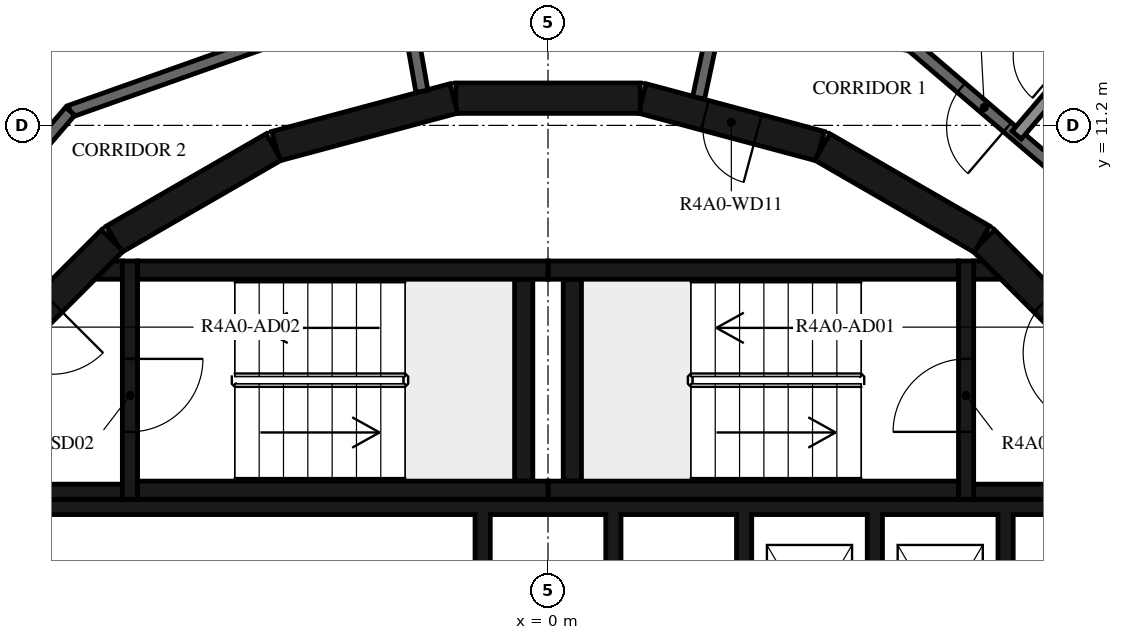
"""IFC4 building model, lengths in metres.
Left out: names, types, materials, properties, quantities, classifications, styles, units other than length and angle.
Written with IfcOpenShell. Run it as: python <this file> out.ifc"""

import sys

from ifc_helpers import new_model, si_unit, direction, frame, frame_2d, origin, place, context, subcontext, project, spatial, polyline, rectangle, outline, extrude, element, fill, save


model = new_model("IFC4")
c1 = context("Model", 3, precision=1e-05, world=origin(), true_north=direction((0.0, 1.0)))
c2 = subcontext(c1, "Body", "Model", "MODEL_VIEW")
j1 = project(units=[si_unit("LENGTHUNIT", "METRE"), si_unit("PLANEANGLEUNIT", "RADIAN")], contexts=[c1])
p1 = place(None, origin())
s1 = spatial("IfcSite", under=j1, at=p1, CompositionType="ELEMENT")
p2 = place(p1, origin())
s2 = spatial("IfcBuilding", under=s1, at=p2, CompositionType="ELEMENT")
p3 = place(p2, frame((0.0, 0.0, 158.7)))
s3 = spatial("IfcBuildingStorey", under=s2, at=p3, CompositionType="ELEMENT", Elevation=158.7)
p4 = place(p3, frame((9.308, 7.164, 0.0), z_axis=(0.0, 0.0, 1.0), x_axis=(-0.707106781187, 0.707106781187, 0.0)))
e1 = element("IfcWall", 1, at=p4, inside=s3, PredefinedType="SHEAR", context=c2, shape_type="SweptSolid", body=[
    extrude(rectangle(XDim=3.032, YDim=0.5, at=frame_2d((1.516, 0.0))), origin(), (0.0, 0.0, 1.0), 3.12),
])
p5 = place(p4, frame((0.416, 0.0, 0.0)))
e2 = element("IfcOpeningElement", 2, at=p5, cuts=e1, PredefinedType="OPENING", context=c2, shape_type="SweptSolid", body=[
    extrude(rectangle(XDim=1.2, YDim=2.1, at=frame_2d((0.6, 1.05))), frame((0.0, 0.26, 0.0), z_axis=(0.0, -1.0, 0.0), x_axis=(1.0, 0.0, 0.0)), (0.0, 0.0, 1.0), 0.52),
])
p6 = place(p3, frame((7.137, 9.329, 0.0), z_axis=(0.0, 0.0, 1.0), x_axis=(-0.865975092491, 0.500087131594, 0.0)))
e3 = element("IfcWall", 3, at=p6, inside=s3, PredefinedType="SHEAR", context=c2, shape_type="SweptSolid", body=[
    extrude(rectangle(XDim=3.033, YDim=0.5, at=frame_2d((1.516, 0.0))), origin(), (0.0, 0.0, 1.0), 3.12),
])
p7 = place(p3, frame((4.479, 10.858, 0.0), z_axis=(0.0, 0.0, 1.0), x_axis=(-0.965948410781, 0.258734743916, 0.0)))
e4 = element("IfcWall", 4, at=p7, inside=s3, PredefinedType="SHEAR", context=c2, shape_type="SweptSolid", body=[
    extrude(rectangle(XDim=3.033, YDim=0.5, at=frame_2d((1.516, 0.0))), origin(), (0.0, 0.0, 1.0), 3.12),
])
p8 = place(p7, frame((1.066, 0.0, 0.0)))
e5 = element("IfcOpeningElement", 5, at=p8, cuts=e4, PredefinedType="OPENING", context=c2, shape_type="SweptSolid", body=[
    extrude(rectangle(XDim=0.9, YDim=2.1, at=frame_2d((0.45, 1.05))), frame((0.0, 0.26, 0.0), z_axis=(0.0, -1.0, 0.0), x_axis=(1.0, 0.0, 0.0)), (0.0, 0.0, 1.0), 0.52),
])
for number, where, z_axis, x_axis in (
    (6, (1.516, 11.647, 0.0), (0.0, 0.0, 1.0), (-1.0, 0.0, 0.0)),
    (7, (-1.55, 11.643, 0.0), (0.0, 0.0, 1.0), (-0.966, -0.259, 0.0)),
    (8, (-4.51, 10.845, 0.0), (0.0, 0.0, 1.0), (-0.866, -0.5, 0.0)),
):
    element("IfcWall", number, at=place(p3, frame(where, z_axis=z_axis, x_axis=x_axis)), inside=s3, PredefinedType="SHEAR", context=c2, shape_type="SweptSolid", body=[
        extrude(rectangle(XDim=3.033, YDim=0.5, at=frame_2d((1.516, 0.0))), origin(), (0.0, 0.0, 1.0), 3.12),
    ])
p9 = place(p3, frame((-7.164, 9.308, 0.0), z_axis=(0.0, 0.0, 1.0), x_axis=(-0.707106781187, -0.707106781187, 0.0)))
e9 = element("IfcWall", 9, at=p9, inside=s3, PredefinedType="SHEAR", context=c2, shape_type="SweptSolid", body=[
    extrude(rectangle(XDim=3.032, YDim=0.5, at=frame_2d((1.516, 0.0))), origin(), (0.0, 0.0, 1.0), 3.12),
])
p10 = place(p9, frame((1.416, 0.0, 0.0)))
e10 = element("IfcOpeningElement", 10, at=p10, cuts=e9, PredefinedType="OPENING", context=c2, shape_type="SweptSolid", body=[
    extrude(rectangle(XDim=1.2, YDim=2.1, at=frame_2d((0.6, 1.05))), frame((0.0, 0.26, 0.0), z_axis=(0.0, -1.0, 0.0), x_axis=(1.0, 0.0, 0.0)), (0.0, 0.0, 1.0), 0.52),
])
for number, where, z_axis, x_axis in (
    (11, (0.0, 5.2, 0.0), (0.0, 0.0, 1.0), (1.0, 0.0, 0.0)),
    (12, (0.0, 8.82, 0.0), (0.0, 0.0, 1.0), (1.0, 0.0, 0.0)),
):
    element("IfcWall", number, at=place(p3, frame(where, z_axis=z_axis, x_axis=x_axis)), inside=s3, PredefinedType="SHEAR", context=c2, shape_type="SweptSolid", body=[
        extrude(rectangle(XDim=6.75, YDim=0.3, at=frame_2d((3.375, 0.0))), origin(), (0.0, 0.0, 1.0), 3.12),
    ])
p11 = place(p3, frame((0.4, 5.35, 0.0), z_axis=(0.0, 0.0, 1.0), x_axis=(0.0, 1.0, 0.0)))
e13 = element("IfcWall", 13, at=p11, inside=s3, PredefinedType="SHEAR", context=c2, shape_type="SweptSolid", body=[
    extrude(rectangle(XDim=3.32, YDim=0.3, at=frame_2d((1.66, 0.0))), origin(), (0.0, 0.0, 1.0), 3.12),
])
p12 = place(p3, frame((6.875, 5.05, 0.0), z_axis=(0.0, 0.0, 1.0), x_axis=(0.0, 1.0, 0.0)))
e14 = element("IfcWall", 14, at=p12, inside=s3, PredefinedType="SHEAR", context=c2, shape_type="SweptSolid", body=[
    extrude(rectangle(XDim=3.92, YDim=0.25, at=frame_2d((1.96, 0.0))), origin(), (0.0, 0.0, 1.0), 3.12),
])
p13 = place(p12, frame((1.11, 0.0, 0.0)))
e15 = element("IfcOpeningElement", 15, at=p13, cuts=e14, PredefinedType="OPENING", context=c2, shape_type="SweptSolid", body=[
    extrude(rectangle(XDim=1.2, YDim=2.1, at=frame_2d((0.6, 1.05))), frame((0.0, 0.135, 0.0), z_axis=(0.0, -1.0, 0.0), x_axis=(1.0, 0.0, 0.0)), (0.0, 0.0, 1.0), 0.27),
])
p14 = place(p3, frame((7.0, 5.175, 0.0), z_axis=(0.0, 0.0, 1.0), x_axis=(1.0, 0.0, 0.0)))
e16 = element("IfcWall", 16, at=p14, inside=s3, PredefinedType="SHEAR", context=c2, shape_type="SweptSolid", body=[
    extrude(rectangle(XDim=3.1, YDim=0.25, at=frame_2d((1.55, 0.0))), origin(), (0.0, 0.0, 1.0), 3.12),
])
p15 = place(p3, origin())
e17 = element("IfcWall", 17, at=p15, inside=s3, PredefinedType="SHEAR", context=c2, shape_type="SweptSolid", body=[
    extrude(outline(polyline([(7.448, 8.67), (7.0, 8.67), (7.0, 8.97), (7.148, 8.97), (7.448, 8.67)])), origin(), (0.0, 0.0, 1.0), 3.12),
])
for number, where, z_axis, x_axis in (
    (18, (-6.75, 5.2, 0.0), (0.0, 0.0, 1.0), (1.0, 0.0, 0.0)),
    (19, (-6.75, 8.82, 0.0), (0.0, 0.0, 1.0), (1.0, 0.0, 0.0)),
):
    element("IfcWall", number, at=place(p3, frame(where, z_axis=z_axis, x_axis=x_axis)), inside=s3, PredefinedType="SHEAR", context=c2, shape_type="SweptSolid", body=[
        extrude(rectangle(XDim=6.75, YDim=0.3, at=frame_2d((3.375, 0.0))), origin(), (0.0, 0.0, 1.0), 3.12),
    ])
p16 = place(p3, frame((-0.4, 5.35, 0.0), z_axis=(0.0, 0.0, 1.0), x_axis=(0.0, 1.0, 0.0)))
e20 = element("IfcWall", 20, at=p16, inside=s3, PredefinedType="SHEAR", context=c2, shape_type="SweptSolid", body=[
    extrude(rectangle(XDim=3.32, YDim=0.3, at=frame_2d((1.66, 0.0))), origin(), (0.0, 0.0, 1.0), 3.12),
])
p17 = place(p3, frame((-6.875, 8.97, 0.0), z_axis=(0.0, 0.0, 1.0), x_axis=(0.0, -1.0, 0.0)))
e21 = element("IfcWall", 21, at=p17, inside=s3, PredefinedType="SHEAR", context=c2, shape_type="SweptSolid", body=[
    extrude(rectangle(XDim=3.92, YDim=0.25, at=frame_2d((1.96, 0.0))), origin(), (0.0, 0.0, 1.0), 3.12),
])
p18 = place(p17, frame((1.61, 0.0, 0.0)))
e22 = element("IfcOpeningElement", 22, at=p18, cuts=e21, PredefinedType="OPENING", context=c2, shape_type="SweptSolid", body=[
    extrude(rectangle(XDim=1.2, YDim=2.1, at=frame_2d((0.6, 1.05))), frame((0.0, 0.135, 0.0), z_axis=(0.0, -1.0, 0.0), x_axis=(1.0, 0.0, 0.0)), (0.0, 0.0, 1.0), 0.27),
])
p19 = place(p3, frame((-7.0, 5.175, 0.0), z_axis=(0.0, 0.0, 1.0), x_axis=(-1.0, 0.0, 0.0)))
e23 = element("IfcWall", 23, at=p19, inside=s3, PredefinedType="SHEAR", context=c2, shape_type="SweptSolid", body=[
    extrude(rectangle(XDim=3.1, YDim=0.25, at=frame_2d((1.55, 0.0))), origin(), (0.0, 0.0, 1.0), 3.12),
])
p20 = place(p3, origin())
e24 = element("IfcWall", 24, at=p20, inside=s3, PredefinedType="SHEAR", context=c2, shape_type="SweptSolid", body=[
    extrude(outline(polyline([(-7.148, 8.97), (-7.0, 8.97), (-7.0, 8.67), (-7.448, 8.67), (-7.148, 8.97)])), origin(), (0.0, 0.0, 1.0), 3.12),
])
p21 = place(p3, origin())
e25 = element("IfcWall", 25, at=p21, inside=s3, PredefinedType="SHEAR", context=c2, shape_type="SweptSolid", body=[
    extrude(outline(polyline([(-9.55, 4.8), (-1.2, 4.8), (-1.2, 1.9), (-0.95, 1.9), (-0.95, 4.8), (0.95, 4.8), (0.95, 1.9), (1.2, 1.9), (1.2, 4.8), (3.1, 4.8), (3.1, 1.9), (3.35, 1.9), (3.35, 4.8), (5.25, 4.8), (5.25, 1.9), (5.5, 1.9), (5.5, 4.8), (7.4, 4.8), (7.4, 1.9), (7.65, 1.9), (7.65, 4.8), (9.55, 4.8), (9.55, 1.9), (9.8, 1.9), (9.8, 4.8), (9.8, 5.05), (-9.8, 5.05), (-9.8, 4.8), (-9.8, 1.9), (-9.55, 1.9), (-9.55, 4.8)])), origin(), (0.0, 0.0, 1.0), 3.12),
])
p22 = place(p3, frame((11.433, 7.858, 0.0), z_axis=(0.0, 0.0, 1.0), x_axis=(-0.760412154545, 0.649440801937, 0.0)))
e26 = element("IfcWall", 26, at=p22, inside=s3, PredefinedType="STANDARD", context=c2, shape_type="SweptSolid", body=[
    extrude(rectangle(XDim=7.181, YDim=0.2, at=frame_2d((3.59, 0.0))), origin(), (0.0, 0.0, 1.0), 3.12),
])
p23 = place(p22, frame((1.7, 0.0, 0.0)))
e27 = element("IfcOpeningElement", 27, at=p23, cuts=e26, PredefinedType="OPENING", context=c2, shape_type="SweptSolid", body=[
    extrude(rectangle(XDim=1.0, YDim=2.1, at=frame_2d((0.5, 1.05))), frame((0.0, 0.11, 0.0), z_axis=(0.0, -1.0, 0.0), x_axis=(1.0, 0.0, 0.0)), (0.0, 0.0, 1.0), 0.22),
])
p24 = place(p22, frame((5.101, 0.0, 0.0)))
e28 = element("IfcOpeningElement", 28, at=p24, cuts=e26, PredefinedType="OPENING", context=c2, shape_type="SweptSolid", body=[
    extrude(rectangle(XDim=1.0, YDim=2.1, at=frame_2d((0.5, 1.05))), frame((0.0, 0.11, 0.0), z_axis=(0.0, -1.0, 0.0), x_axis=(1.0, 0.0, 0.0)), (0.0, 0.0, 1.0), 0.22),
])
p25 = place(p3, frame((2.787, 13.112, 0.0), z_axis=(0.0, 0.0, 1.0), x_axis=(-0.207941001029, -0.978141370197, 0.0)))
e29 = element("IfcWall", 29, at=p25, inside=s3, PredefinedType="STANDARD", context=c2, shape_type="SweptSolid", body=[
    extrude(rectangle(XDim=1.491, YDim=0.2, at=frame_2d((0.746, 0.0))), origin(), (0.0, 0.0, 1.0), 3.12),
])
p26 = place(p3, frame((-2.074, 11.761, 0.0), z_axis=(0.0, 0.0, 1.0), x_axis=(-0.1736412798, 0.984808969267, 0.0)))
e30 = element("IfcWall", 30, at=p26, inside=s3, PredefinedType="STANDARD", context=c2, shape_type="SweptSolid", body=[
    extrude(rectangle(XDim=1.644, YDim=0.2, at=frame_2d((0.822, 0.0))), origin(), (0.0, 0.0, 1.0), 3.12),
])
p27 = place(p3, frame((-2.359, 13.38, 0.0), z_axis=(0.0, 0.0, 1.0), x_axis=(-0.942647529236, -0.333789807551, 0.0)))
e31 = element("IfcWall", 31, at=p27, inside=s3, PredefinedType="STANDARD", context=c2, shape_type="SweptSolid", body=[
    extrude(rectangle(XDim=5.833, YDim=0.2, at=frame_2d((2.917, 0.0))), origin(), (0.0, 0.0, 1.0), 3.12),
])
p28 = place(p3, frame((-7.858, 11.433, 0.0), z_axis=(0.0, 0.0, 1.0), x_axis=(-0.649440801937, -0.760412154545, 0.0)))
e32 = element("IfcWall", 32, at=p28, inside=s3, PredefinedType="STANDARD", context=c2, shape_type="SweptSolid", body=[
    extrude(rectangle(XDim=7.181, YDim=0.2, at=frame_2d((3.59, 0.0))), origin(), (0.0, 0.0, 1.0), 3.12),
])
p29 = place(p28, frame((2.6, 0.0, 0.0)))
e33 = element("IfcOpeningElement", 33, at=p29, cuts=e32, PredefinedType="OPENING", context=c2, shape_type="SweptSolid", body=[
    extrude(rectangle(XDim=1.0, YDim=2.1, at=frame_2d((0.5, 1.05))), frame((0.0, 0.11, 0.0), z_axis=(0.0, -1.0, 0.0), x_axis=(1.0, 0.0, 0.0)), (0.0, 0.0, 1.0), 0.22),
])
p30 = place(p3, frame((11.04, 14.943, 0.0), z_axis=(0.0, 0.0, 1.0), x_axis=(-0.649442880087, -0.760410379666, 0.0)))
e34 = element("IfcWall", 34, at=p30, inside=s3, PredefinedType="STANDARD", context=c2, shape_type="SweptSolid", body=[
    extrude(rectangle(XDim=5.133, YDim=0.2, at=frame_2d((2.566, 0.0))), origin(), (0.0, 0.0, 1.0), 2.73),
])
p31 = place(p3, frame((8.702, 12.206, 0.0), z_axis=(0.0, 0.0, 1.0), x_axis=(-0.760401313718, 0.649453494945, 0.0)))
e35 = element("IfcWall", 35, at=p31, inside=s3, PredefinedType="PARTITIONING", context=c2, shape_type="SweptSolid", body=[
    extrude(rectangle(XDim=16.724, YDim=0.12, at=frame_2d((8.362, 0.0))), origin(), (0.0, 0.0, 1.0), 3.12),
])
p32 = place(p31, frame((0.2, 0.0, 0.0)))
e36 = element("IfcOpeningElement", 36, at=p32, cuts=e35, PredefinedType="OPENING", context=c2, shape_type="SweptSolid", body=[
    extrude(rectangle(XDim=0.9, YDim=2.1, at=frame_2d((0.45, 1.05))), frame((0.0, 0.07, 0.0), z_axis=(0.0, -1.0, 0.0), x_axis=(1.0, 0.0, 0.0)), (0.0, 0.0, 1.0), 0.14),
])
p33 = place(p31, frame((7.099, 0.0, 0.0)))
e37 = element("IfcOpeningElement", 37, at=p33, cuts=e35, PredefinedType="OPENING", context=c2, shape_type="SweptSolid", body=[
    extrude(rectangle(XDim=0.9, YDim=2.1, at=frame_2d((0.45, 1.05))), frame((0.0, 0.07, 0.0), z_axis=(0.0, -1.0, 0.0), x_axis=(1.0, 0.0, 0.0)), (0.0, 0.0, 1.0), 0.14),
])
p34 = place(p13, origin())
e38 = element("IfcDoor", 38, at=p34, inside=s3, OperationType="SINGLE_SWING_LEFT", PredefinedType="DOOR", context=c2, shape_type="SweptSolid", body=[
    extrude(rectangle(XDim=1.2, YDim=2.1, at=frame_2d((0.6, 1.05))), frame((0.0, 0.025, 0.0), z_axis=(0.0, -1.0, 0.0), x_axis=(1.0, 0.0, 0.0)), (0.0, 0.0, 1.0), 0.05),
])
fill(e15, e38)
p35 = place(p5, origin())
e39 = element("IfcDoor", 39, at=p35, inside=s3, OperationType="SINGLE_SWING_RIGHT", PredefinedType="DOOR", context=c2, shape_type="SweptSolid", body=[
    extrude(rectangle(XDim=1.2, YDim=2.1, at=frame_2d((0.6, 1.05))), frame((0.0, 0.025, 0.0), z_axis=(0.0, -1.0, 0.0), x_axis=(1.0, 0.0, 0.0)), (0.0, 0.0, 1.0), 0.05),
])
fill(e2, e39)
p36 = place(p18, origin())
e40 = element("IfcDoor", 40, at=p36, inside=s3, OperationType="SINGLE_SWING_LEFT", PredefinedType="DOOR", context=c2, shape_type="SweptSolid", body=[
    extrude(rectangle(XDim=1.2, YDim=2.1, at=frame_2d((0.6, 1.05))), frame((0.0, 0.025, 0.0), z_axis=(0.0, -1.0, 0.0), x_axis=(1.0, 0.0, 0.0)), (0.0, 0.0, 1.0), 0.05),
])
fill(e22, e40)
p37 = place(p10, origin())
e41 = element("IfcDoor", 41, at=p37, inside=s3, OperationType="SINGLE_SWING_RIGHT", PredefinedType="DOOR", context=c2, shape_type="SweptSolid", body=[
    extrude(rectangle(XDim=1.2, YDim=2.1, at=frame_2d((0.6, 1.05))), frame((0.0, 0.025, 0.0), z_axis=(0.0, -1.0, 0.0), x_axis=(1.0, 0.0, 0.0)), (0.0, 0.0, 1.0), 0.05),
])
fill(e10, e41)
p38 = place(p8, origin())
e42 = element("IfcDoor", 42, at=p38, inside=s3, OperationType="SINGLE_SWING_LEFT", PredefinedType="DOOR", context=c2, shape_type="SweptSolid", body=[
    extrude(rectangle(XDim=0.9, YDim=2.1, at=frame_2d((0.45, 1.05))), frame((0.0, 0.025, 0.0), z_axis=(0.0, -1.0, 0.0), x_axis=(1.0, 0.0, 0.0)), (0.0, 0.0, 1.0), 0.05),
])
fill(e5, e42)
p39 = place(p24, origin())
e43 = element("IfcDoor", 43, at=p39, inside=s3, OperationType="SINGLE_SWING_RIGHT", PredefinedType="DOOR", context=c2, shape_type="SweptSolid", body=[
    extrude(rectangle(XDim=1.0, YDim=2.1, at=frame_2d((0.5, 1.05))), frame((0.0, 0.025, 0.0), z_axis=(0.0, -1.0, 0.0), x_axis=(1.0, 0.0, 0.0)), (0.0, 0.0, 1.0), 0.05),
])
fill(e28, e43)
p40 = place(p32, origin())
e44 = element("IfcDoor", 44, at=p40, inside=s3, OperationType="SINGLE_SWING_RIGHT", PredefinedType="DOOR", context=c2, shape_type="SweptSolid", body=[
    extrude(rectangle(XDim=0.9, YDim=2.1, at=frame_2d((0.45, 1.05))), frame((0.0, 0.025, 0.0), z_axis=(0.0, -1.0, 0.0), x_axis=(1.0, 0.0, 0.0)), (0.0, 0.0, 1.0), 0.05),
])
fill(e36, e44)
save(model, sys.argv[1])
